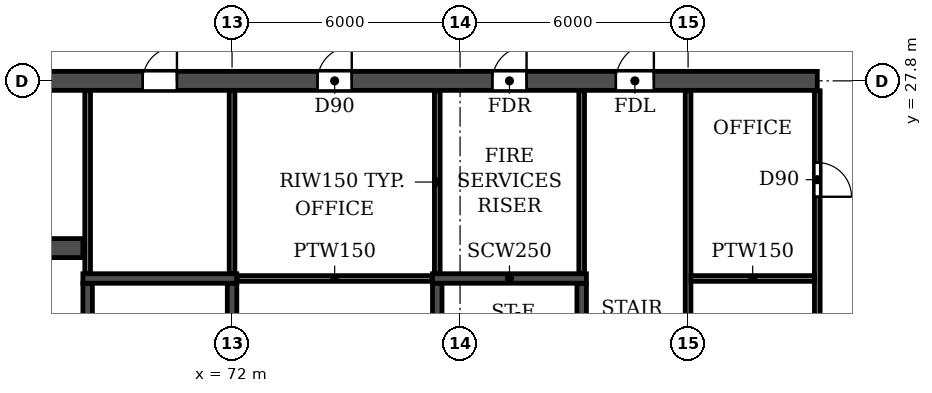
"""IFC4 building model, lengths in metres.
Left out: names, types, materials, properties, quantities, classifications, styles, units other than length and angle.
Written with IfcOpenShell. Run it as: python <this file> out.ifc"""

import sys

from ifc_helpers import new_model, si_unit, direction, frame, frame_2d, origin, place, context, subcontext, project, spatial, rectangle, extrude, element, fill, save


model = new_model("IFC4")
c1 = context("Model", 3, precision=1e-05, world=origin(), true_north=direction((0.0, 1.0)))
c2 = subcontext(c1, "Body", "Model", "MODEL_VIEW")
j1 = project(units=[si_unit("LENGTHUNIT", "METRE"), si_unit("PLANEANGLEUNIT", "RADIAN")], contexts=[c1])
p1 = place(None, origin())
s1 = spatial("IfcSite", under=j1, at=p1, CompositionType="ELEMENT")
p2 = place(p1, origin())
s2 = spatial("IfcBuilding", under=s1, at=p2, CompositionType="ELEMENT")
p3 = place(p2, frame((0.0, 0.0, 105.9)))
s3 = spatial("IfcBuildingStorey", under=s2, at=p3, CompositionType="ELEMENT", Elevation=105.9)
p4 = place(p3, frame((14.6, 27.8, 0.0), z_axis=(0.0, 0.0, 1.0), x_axis=(1.0, 0.0, 0.0)))
e1 = element("IfcWall", 1, at=p4, inside=s3, PredefinedType="SOLIDWALL", context=c2, shape_type="SweptSolid", body=[
    extrude(rectangle(XDim=72.8, YDim=0.5, at=frame_2d((36.4, 0.0))), origin(), (0.0, 0.0, 1.0), 3.06),
])
p5 = place(p4, frame((4.3, 0.0, 0.0)))
e2 = element("IfcOpeningElement", 2, at=p5, cuts=e1, PredefinedType="OPENING", context=c2, shape_type="SweptSolid", body=[
    extrude(rectangle(XDim=1.0, YDim=2.1, at=frame_2d((0.5, 1.05))), frame((0.0, 0.26, 0.0), z_axis=(0.0, -1.0, 0.0), x_axis=(1.0, 0.0, 0.0)), (0.0, 0.0, 1.0), 0.52),
])
p6 = place(p4, frame((7.65, 0.0, 0.0)))
e3 = element("IfcOpeningElement", 3, at=p6, cuts=e1, PredefinedType="OPENING", context=c2, shape_type="SweptSolid", body=[
    extrude(rectangle(XDim=0.9, YDim=2.1, at=frame_2d((0.45, 1.05))), frame((0.0, 0.26, 0.0), z_axis=(0.0, -1.0, 0.0), x_axis=(1.0, 0.0, 0.0)), (0.0, 0.0, 1.0), 0.52),
])
p7 = place(p4, frame((12.25, 0.0, 0.0)))
e4 = element("IfcOpeningElement", 4, at=p7, cuts=e1, PredefinedType="OPENING", context=c2, shape_type="SweptSolid", body=[
    extrude(rectangle(XDim=0.9, YDim=2.1, at=frame_2d((0.45, 1.05))), frame((0.0, 0.26, 0.0), z_axis=(0.0, -1.0, 0.0), x_axis=(1.0, 0.0, 0.0)), (0.0, 0.0, 1.0), 0.52),
])
p8 = place(p4, frame((16.85, 0.0, 0.0)))
e5 = element("IfcOpeningElement", 5, at=p8, cuts=e1, PredefinedType="OPENING", context=c2, shape_type="SweptSolid", body=[
    extrude(rectangle(XDim=0.9, YDim=2.1, at=frame_2d((0.45, 1.05))), frame((0.0, 0.26, 0.0), z_axis=(0.0, -1.0, 0.0), x_axis=(1.0, 0.0, 0.0)), (0.0, 0.0, 1.0), 0.52),
])
p9 = place(p4, frame((21.3, 0.0, 0.0)))
e6 = element("IfcOpeningElement", 6, at=p9, cuts=e1, PredefinedType="OPENING", context=c2, shape_type="SweptSolid", body=[
    extrude(rectangle(XDim=1.0, YDim=2.1, at=frame_2d((0.5, 1.05))), frame((0.0, 0.26, 0.0), z_axis=(0.0, -1.0, 0.0), x_axis=(1.0, 0.0, 0.0)), (0.0, 0.0, 1.0), 0.52),
])
p10 = place(p4, frame((26.25, 0.0, 0.0)))
e7 = element("IfcOpeningElement", 7, at=p10, cuts=e1, PredefinedType="OPENING", context=c2, shape_type="SweptSolid", body=[
    extrude(rectangle(XDim=1.5, YDim=2.1, at=frame_2d((0.75, 1.05))), frame((0.0, 0.26, 0.0), z_axis=(0.0, -1.0, 0.0), x_axis=(1.0, 0.0, 0.0)), (0.0, 0.0, 1.0), 0.52),
])
p11 = place(p4, frame((33.0, 0.0, 0.0)))
e8 = element("IfcOpeningElement", 8, at=p11, cuts=e1, PredefinedType="OPENING", context=c2, shape_type="SweptSolid", body=[
    extrude(rectangle(XDim=1.0, YDim=2.1, at=frame_2d((0.5, 1.05))), frame((0.0, 0.26, 0.0), z_axis=(0.0, -1.0, 0.0), x_axis=(1.0, 0.0, 0.0)), (0.0, 0.0, 1.0), 0.52),
])
p12 = place(p4, frame((35.9, 0.0, 0.0)))
e9 = element("IfcOpeningElement", 9, at=p12, cuts=e1, PredefinedType="OPENING", context=c2, shape_type="SweptSolid", body=[
    extrude(rectangle(XDim=1.0, YDim=2.1, at=frame_2d((0.5, 1.05))), frame((0.0, 0.26, 0.0), z_axis=(0.0, -1.0, 0.0), x_axis=(1.0, 0.0, 0.0)), (0.0, 0.0, 1.0), 0.52),
])
p13 = place(p4, frame((40.1, 0.0, 0.0)))
e10 = element("IfcOpeningElement", 10, at=p13, cuts=e1, PredefinedType="OPENING", context=c2, shape_type="SweptSolid", body=[
    extrude(rectangle(XDim=1.0, YDim=2.1, at=frame_2d((0.5, 1.05))), frame((0.0, 0.26, 0.0), z_axis=(0.0, -1.0, 0.0), x_axis=(1.0, 0.0, 0.0)), (0.0, 0.0, 1.0), 0.52),
])
p14 = place(p4, frame((44.0, 0.0, 0.0)))
e11 = element("IfcOpeningElement", 11, at=p14, cuts=e1, PredefinedType="OPENING", context=c2, shape_type="SweptSolid", body=[
    extrude(rectangle(XDim=1.0, YDim=2.1, at=frame_2d((0.5, 1.05))), frame((0.0, 0.26, 0.0), z_axis=(0.0, -1.0, 0.0), x_axis=(1.0, 0.0, 0.0)), (0.0, 0.0, 1.0), 0.52),
])
p15 = place(p4, frame((49.2, 0.0, 0.0)))
e12 = element("IfcOpeningElement", 12, at=p15, cuts=e1, PredefinedType="OPENING", context=c2, shape_type="SweptSolid", body=[
    extrude(rectangle(XDim=1.0, YDim=2.1, at=frame_2d((0.5, 1.05))), frame((0.0, 0.26, 0.0), z_axis=(0.0, -1.0, 0.0), x_axis=(1.0, 0.0, 0.0)), (0.0, 0.0, 1.0), 0.52),
])
p16 = place(p4, frame((55.05, 0.0, 0.0)))
e13 = element("IfcOpeningElement", 13, at=p16, cuts=e1, PredefinedType="OPENING", context=c2, shape_type="SweptSolid", body=[
    extrude(rectangle(XDim=0.9, YDim=2.1, at=frame_2d((0.45, 1.05))), frame((0.0, 0.26, 0.0), z_axis=(0.0, -1.0, 0.0), x_axis=(1.0, 0.0, 0.0)), (0.0, 0.0, 1.0), 0.52),
])
p17 = place(p4, frame((59.65, 0.0, 0.0)))
e14 = element("IfcOpeningElement", 14, at=p17, cuts=e1, PredefinedType="OPENING", context=c2, shape_type="SweptSolid", body=[
    extrude(rectangle(XDim=0.9, YDim=2.1, at=frame_2d((0.45, 1.05))), frame((0.0, 0.26, 0.0), z_axis=(0.0, -1.0, 0.0), x_axis=(1.0, 0.0, 0.0)), (0.0, 0.0, 1.0), 0.52),
])
p18 = place(p4, frame((64.25, 0.0, 0.0)))
e15 = element("IfcOpeningElement", 15, at=p18, cuts=e1, PredefinedType="OPENING", context=c2, shape_type="SweptSolid", body=[
    extrude(rectangle(XDim=0.9, YDim=2.1, at=frame_2d((0.45, 1.05))), frame((0.0, 0.26, 0.0), z_axis=(0.0, -1.0, 0.0), x_axis=(1.0, 0.0, 0.0)), (0.0, 0.0, 1.0), 0.52),
])
p19 = place(p4, frame((67.5, 0.0, 0.0)))
e16 = element("IfcOpeningElement", 16, at=p19, cuts=e1, PredefinedType="OPENING", context=c2, shape_type="SweptSolid", body=[
    extrude(rectangle(XDim=1.0, YDim=2.1, at=frame_2d((0.5, 1.05))), frame((0.0, 0.26, 0.0), z_axis=(0.0, -1.0, 0.0), x_axis=(1.0, 0.0, 0.0)), (0.0, 0.0, 1.0), 0.52),
])
p20 = place(p3, frame((33.925, 23.4, 0.0), z_axis=(0.0, 0.0, 1.0), x_axis=(1.0, 0.0, 0.0)))
e17 = element("IfcWall", 17, at=p20, inside=s3, PredefinedType="SOLIDWALL", context=c2, shape_type="SweptSolid", body=[
    extrude(rectangle(XDim=34.15, YDim=0.5, at=frame_2d((17.075, 0.0))), origin(), (0.0, 0.0, 1.0), 3.06),
])
p21 = place(p20, frame((16.175, 0.0, 0.0)))
e18 = element("IfcOpeningElement", 18, at=p21, cuts=e17, PredefinedType="OPENING", context=c2, shape_type="SweptSolid", body=[
    extrude(rectangle(XDim=1.8, YDim=2.1, at=frame_2d((0.9, 1.05))), frame((0.0, 0.26, 0.0), z_axis=(0.0, -1.0, 0.0), x_axis=(1.0, 0.0, 0.0)), (0.0, 0.0, 1.0), 0.52),
])
p22 = place(p20, frame((11.025, 0.0, 0.0)))
e19 = element("IfcOpeningElement", 19, at=p22, cuts=e17, PredefinedType="OPENING", context=c2, shape_type="SweptSolid", body=[
    extrude(rectangle(XDim=1.1, YDim=2.1, at=frame_2d((0.55, 1.05))), frame((0.0, 0.26, 0.0), z_axis=(0.0, -1.0, 0.0), x_axis=(1.0, 0.0, 0.0)), (0.0, 0.0, 1.0), 0.52),
])
p23 = place(p3, frame((68.2, 14.85, 0.0), z_axis=(0.0, 0.0, 1.0), x_axis=(0.0, 1.0, 0.0)))
e20 = element("IfcWall", 20, at=p23, inside=s3, PredefinedType="SOLIDWALL", context=c2, shape_type="SweptSolid", body=[
    extrude(rectangle(XDim=7.625, YDim=0.25, at=frame_2d((3.812, 0.0))), origin(), (0.0, 0.0, 1.0), 3.06),
])
p24 = place(p23, frame((0.45, 0.0, 0.0)))
e21 = element("IfcOpeningElement", 21, at=p24, cuts=e20, PredefinedType="OPENING", context=c2, shape_type="SweptSolid", body=[
    extrude(rectangle(XDim=1.0, YDim=2.1, at=frame_2d((0.5, 1.05))), frame((0.0, 0.135, 0.0), z_axis=(0.0, -1.0, 0.0), x_axis=(1.0, 0.0, 0.0)), (0.0, 0.0, 1.0), 0.27),
])
p25 = place(p3, frame((72.0, 14.85, 0.0), z_axis=(0.0, 0.0, 1.0), x_axis=(0.0, 1.0, 0.0)))
e22 = element("IfcWall", 22, at=p25, inside=s3, PredefinedType="SOLIDWALL", context=c2, shape_type="SweptSolid", body=[
    extrude(rectangle(XDim=7.625, YDim=0.25, at=frame_2d((3.812, 0.0))), origin(), (0.0, 0.0, 1.0), 3.06),
])
p26 = place(p3, frame((68.075, 22.6, 0.0), z_axis=(0.0, 0.0, 1.0), x_axis=(1.0, 0.0, 0.0)))
e23 = element("IfcWall", 23, at=p26, inside=s3, PredefinedType="SOLIDWALL", context=c2, shape_type="SweptSolid", body=[
    extrude(rectangle(XDim=4.05, YDim=0.25, at=frame_2d((2.025, 0.0))), origin(), (0.0, 0.0, 1.0), 3.06),
])
p27 = place(p3, frame((77.4, 14.85, 0.0), z_axis=(0.0, 0.0, 1.0), x_axis=(0.0, 1.0, 0.0)))
e24 = element("IfcWall", 24, at=p27, inside=s3, PredefinedType="SOLIDWALL", context=c2, shape_type="SweptSolid", body=[
    extrude(rectangle(XDim=7.625, YDim=0.25, at=frame_2d((3.812, 0.0))), origin(), (0.0, 0.0, 1.0), 3.06),
])
p28 = place(p3, frame((81.2, 14.85, 0.0), z_axis=(0.0, 0.0, 1.0), x_axis=(0.0, 1.0, 0.0)))
e25 = element("IfcWall", 25, at=p28, inside=s3, PredefinedType="SOLIDWALL", context=c2, shape_type="SweptSolid", body=[
    extrude(rectangle(XDim=7.625, YDim=0.25, at=frame_2d((3.812, 0.0))), origin(), (0.0, 0.0, 1.0), 3.06),
])
p29 = place(p28, frame((0.45, 0.0, 0.0)))
e26 = element("IfcOpeningElement", 26, at=p29, cuts=e25, PredefinedType="OPENING", context=c2, shape_type="SweptSolid", body=[
    extrude(rectangle(XDim=1.0, YDim=2.1, at=frame_2d((0.5, 1.05))), frame((0.0, 0.135, 0.0), z_axis=(0.0, -1.0, 0.0), x_axis=(1.0, 0.0, 0.0)), (0.0, 0.0, 1.0), 0.27),
])
p30 = place(p3, frame((77.275, 22.6, 0.0), z_axis=(0.0, 0.0, 1.0), x_axis=(1.0, 0.0, 0.0)))
e27 = element("IfcWall", 27, at=p30, inside=s3, PredefinedType="SOLIDWALL", context=c2, shape_type="SweptSolid", body=[
    extrude(rectangle(XDim=4.05, YDim=0.25, at=frame_2d((2.025, 0.0))), origin(), (0.0, 0.0, 1.0), 3.06),
])
p31 = place(p3, frame((84.0, 14.86, 0.0), z_axis=(0.0, 0.0, 1.0), x_axis=(0.0, 1.0, 0.0)))
e28 = element("IfcWall", 28, at=p31, inside=s3, PredefinedType="PARTITIONING", context=c2, shape_type="SweptSolid", body=[
    extrude(rectangle(XDim=12.68, YDim=0.15, at=frame_2d((6.34, 0.0))), origin(), (0.0, 0.0, 1.0), 3.06),
])
p32 = place(p3, frame((87.4, 14.86, 0.0), z_axis=(0.0, 0.0, 1.0), x_axis=(0.0, 1.0, 0.0)))
e29 = element("IfcWall", 29, at=p32, inside=s3, PredefinedType="PARTITIONING", context=c2, shape_type="SweptSolid", body=[
    extrude(rectangle(XDim=12.68, YDim=0.15, at=frame_2d((6.34, 0.0))), origin(), (0.0, 0.0, 1.0), 3.06),
])
p33 = place(p32, frame((3.29, 0.0, 0.0)))
e30 = element("IfcOpeningElement", 30, at=p33, cuts=e29, PredefinedType="OPENING", context=c2, shape_type="SweptSolid", body=[
    extrude(rectangle(XDim=0.9, YDim=2.1, at=frame_2d((0.45, 1.05))), frame((0.0, 0.085, 0.0), z_axis=(0.0, -1.0, 0.0), x_axis=(1.0, 0.0, 0.0)), (0.0, 0.0, 1.0), 0.17),
])
p34 = place(p32, frame((9.89, 0.0, 0.0)))
e31 = element("IfcOpeningElement", 31, at=p34, cuts=e29, PredefinedType="OPENING", context=c2, shape_type="SweptSolid", body=[
    extrude(rectangle(XDim=0.9, YDim=2.1, at=frame_2d((0.45, 1.05))), frame((0.0, 0.085, 0.0), z_axis=(0.0, -1.0, 0.0), x_axis=(1.0, 0.0, 0.0)), (0.0, 0.0, 1.0), 0.17),
])
p35 = place(p3, frame((72.135, 22.6, 0.0), z_axis=(0.0, 0.0, 1.0), x_axis=(1.0, 0.0, 0.0)))
e32 = element("IfcWall", 32, at=p35, inside=s3, PredefinedType="PARTITIONING", context=c2, shape_type="SweptSolid", body=[
    extrude(rectangle(XDim=5.13, YDim=0.15, at=frame_2d((2.565, 0.0))), origin(), (0.0, 0.0, 1.0), 3.06),
])
p36 = place(p3, frame((84.075, 22.6, 0.0), z_axis=(0.0, 0.0, 1.0), x_axis=(1.0, 0.0, 0.0)))
e33 = element("IfcWall", 33, at=p36, inside=s3, PredefinedType="PARTITIONING", context=c2, shape_type="SweptSolid", body=[
    extrude(rectangle(XDim=3.25, YDim=0.15, at=frame_2d((1.625, 0.0))), origin(), (0.0, 0.0, 1.0), 3.06),
])
for number, where, z_axis, x_axis in (
    (34, (68.2, 22.735, 0.0), (0.0, 0.0, 1.0), (0.0, 1.0, 0.0)),
    (35, (72.0, 22.735, 0.0), (0.0, 0.0, 1.0), (0.0, 1.0, 0.0)),
    (36, (77.4, 22.735, 0.0), (0.0, 0.0, 1.0), (0.0, 1.0, 0.0)),
    (37, (81.2, 22.735, 0.0), (0.0, 0.0, 1.0), (0.0, 1.0, 0.0)),
):
    element("IfcWall", number, at=place(p3, frame(where, z_axis=z_axis, x_axis=x_axis)), inside=s3, PredefinedType="PARTITIONING", context=c2, shape_type="SweptSolid", body=[
        extrude(rectangle(XDim=4.805, YDim=0.15, at=frame_2d((2.402, 0.0))), origin(), (0.0, 0.0, 1.0), 3.06),
    ])
p37 = place(p34, frame((0.9, 0.0, 0.0), z_axis=(0.0, 0.0, 1.0), x_axis=(-1.0, 0.0, 0.0)))
e38 = element("IfcDoor", 38, at=p37, inside=s3, OperationType="SINGLE_SWING_RIGHT", PredefinedType="DOOR", context=c2, shape_type="SweptSolid", body=[
    extrude(rectangle(XDim=0.9, YDim=2.1, at=frame_2d((0.45, 1.05))), frame((0.0, 0.025, 0.0), z_axis=(0.0, -1.0, 0.0), x_axis=(1.0, 0.0, 0.0)), (0.0, 0.0, 1.0), 0.05),
])
fill(e31, e38)
p38 = place(p16, origin())
e39 = element("IfcDoor", 39, at=p38, inside=s3, OperationType="SINGLE_SWING_RIGHT", PredefinedType="DOOR", context=c2, shape_type="SweptSolid", body=[
    extrude(rectangle(XDim=0.9, YDim=2.1, at=frame_2d((0.45, 1.05))), frame((0.0, 0.025, 0.0), z_axis=(0.0, -1.0, 0.0), x_axis=(1.0, 0.0, 0.0)), (0.0, 0.0, 1.0), 0.05),
])
fill(e13, e39)
p39 = place(p17, origin())
e40 = element("IfcDoor", 40, at=p39, inside=s3, OperationType="SINGLE_SWING_RIGHT", PredefinedType="DOOR", context=c2, shape_type="SweptSolid", body=[
    extrude(rectangle(XDim=0.9, YDim=2.1, at=frame_2d((0.45, 1.05))), frame((0.0, 0.025, 0.0), z_axis=(0.0, -1.0, 0.0), x_axis=(1.0, 0.0, 0.0)), (0.0, 0.0, 1.0), 0.05),
])
fill(e14, e40)
p40 = place(p18, origin())
e41 = element("IfcDoor", 41, at=p40, inside=s3, OperationType="SINGLE_SWING_RIGHT", PredefinedType="DOOR", context=c2, shape_type="SweptSolid", body=[
    extrude(rectangle(XDim=0.9, YDim=2.1, at=frame_2d((0.45, 1.05))), frame((0.0, 0.025, 0.0), z_axis=(0.0, -1.0, 0.0), x_axis=(1.0, 0.0, 0.0)), (0.0, 0.0, 1.0), 0.05),
])
fill(e15, e41)
p41 = place(p19, origin())
e42 = element("IfcDoor", 42, at=p41, inside=s3, OperationType="SINGLE_SWING_RIGHT", PredefinedType="DOOR", context=c2, shape_type="SweptSolid", body=[
    extrude(rectangle(XDim=1.0, YDim=2.1, at=frame_2d((0.5, 1.05))), frame((0.0, 0.025, 0.0), z_axis=(0.0, -1.0, 0.0), x_axis=(1.0, 0.0, 0.0)), (0.0, 0.0, 1.0), 0.05),
])
fill(e16, e42)
save(model, sys.argv[1])
